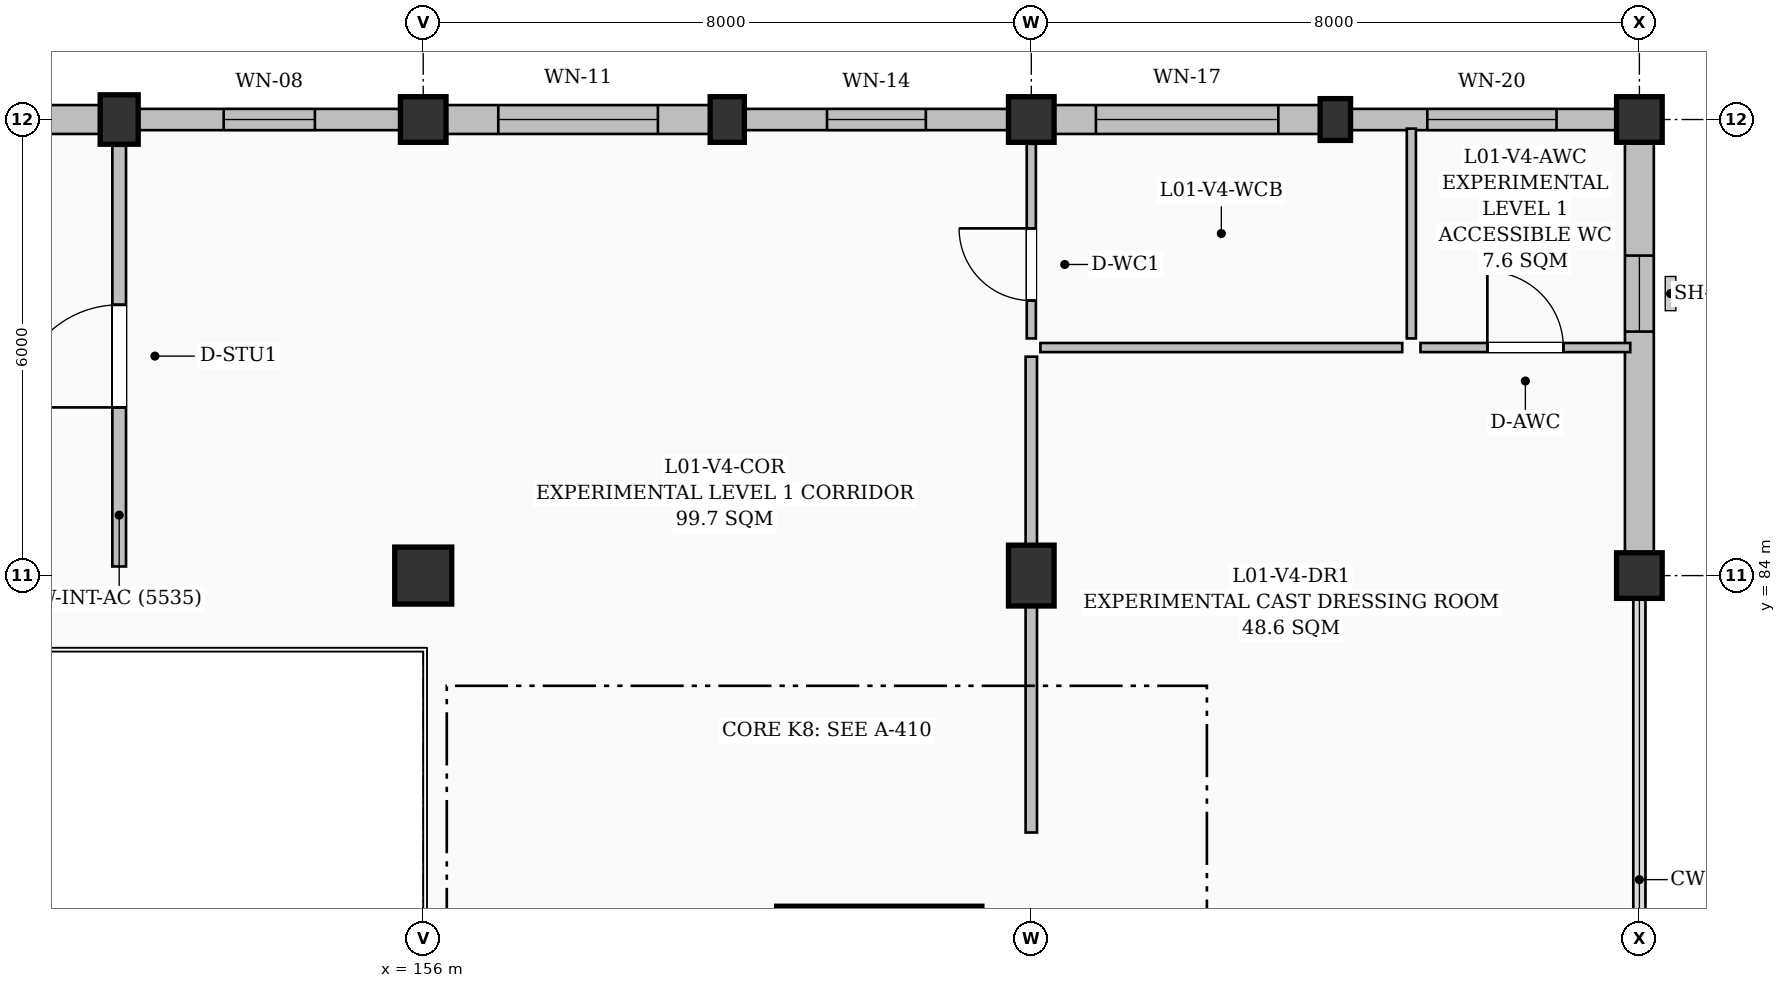
"""IFC4 building model, lengths in metres.
Left out: names, types, materials, properties, quantities, classifications, styles, units other than length and angle.
Written with IfcOpenShell. Run it as: python <this file> out.ifc"""

import sys

from ifc_helpers import new_model, si_unit, direction, frame, frame_2d, origin, origin_2d, place, context, subcontext, project, spatial, rectangle, extrude, element, fill, save


model = new_model("IFC4")
c1 = context("Model", 3, precision=1e-05, world=origin(), true_north=direction((0.0, 1.0)))
c2 = subcontext(c1, "Body", "Model", "MODEL_VIEW")
j1 = project(units=[si_unit("LENGTHUNIT", "METRE"), si_unit("PLANEANGLEUNIT", "RADIAN")], contexts=[c1])
p1 = place(None, origin())
s1 = spatial("IfcSite", under=j1, at=p1, CompositionType="ELEMENT")
p2 = place(p1, origin())
s2 = spatial("IfcBuilding", under=s1, at=p2, CompositionType="ELEMENT")
p3 = place(p2, frame((0.0, 0.0, 4.8)))
s3 = spatial("IfcBuildingStorey", under=s2, at=p3, CompositionType="ELEMENT", Elevation=4.8)
p4 = place(p3, frame((152.0, 90.0, 0.0), z_axis=(0.0, 0.0, 1.0), x_axis=(1.0, 0.0, 0.0)))
e1 = element("IfcColumn", 1, at=p4, inside=s3, PredefinedType="PILASTER", context=c2, shape_type="SweptSolid", body=[
    extrude(rectangle(XDim=0.5, YDim=0.65, at=origin_2d()), origin(), (0.0, 0.0, 1.0), 4.5),
])
p5 = place(p3, frame((156.0, 84.0, 0.0), z_axis=(0.0, 0.0, 1.0), x_axis=(1.0, 0.0, 0.0)))
e2 = element("IfcColumn", 2, at=p5, inside=s3, PredefinedType="COLUMN", context=c2, shape_type="SweptSolid", body=[
    extrude(rectangle(XDim=0.75, YDim=0.75, at=origin_2d()), origin(), (0.0, 0.0, 1.0), 4.5),
])
p6 = place(p3, frame((156.0, 90.0, 0.0), z_axis=(0.0, 0.0, 1.0), x_axis=(1.0, 0.0, 0.0)))
e3 = element("IfcColumn", 3, at=p6, inside=s3, PredefinedType="COLUMN", context=c2, shape_type="SweptSolid", body=[
    extrude(rectangle(XDim=0.6, YDim=0.6, at=origin_2d()), origin(), (0.0, 0.0, 1.0), 4.5),
])
p7 = place(p3, frame((160.0, 90.0, 0.0), z_axis=(0.0, 0.0, 1.0), x_axis=(1.0, 0.0, 0.0)))
e4 = element("IfcColumn", 4, at=p7, inside=s3, PredefinedType="PILASTER", context=c2, shape_type="SweptSolid", body=[
    extrude(rectangle(XDim=0.45, YDim=0.6, at=origin_2d()), origin(), (0.0, 0.0, 1.0), 4.5),
])
p8 = place(p3, frame((164.0, 84.0, 0.0), z_axis=(0.0, 0.0, 1.0), x_axis=(1.0, 0.0, 0.0)))
e5 = element("IfcColumn", 5, at=p8, inside=s3, PredefinedType="COLUMN", context=c2, shape_type="SweptSolid", body=[
    extrude(rectangle(XDim=0.6, YDim=0.8, at=origin_2d()), origin(), (0.0, 0.0, 1.0), 4.5),
])
p9 = place(p3, frame((164.0, 90.0, 0.0), z_axis=(0.0, 0.0, 1.0), x_axis=(1.0, 0.0, 0.0)))
e6 = element("IfcColumn", 6, at=p9, inside=s3, PredefinedType="COLUMN", context=c2, shape_type="SweptSolid", body=[
    extrude(rectangle(XDim=0.6, YDim=0.6, at=origin_2d()), origin(), (0.0, 0.0, 1.0), 4.5),
])
p10 = place(p3, frame((168.0, 90.0, 0.0), z_axis=(0.0, 0.0, 1.0), x_axis=(1.0, 0.0, 0.0)))
e7 = element("IfcColumn", 7, at=p10, inside=s3, PredefinedType="PILASTER", context=c2, shape_type="SweptSolid", body=[
    extrude(rectangle(XDim=0.4, YDim=0.55, at=origin_2d()), origin(), (0.0, 0.0, 1.0), 4.5),
])
for number, where, z_axis, x_axis in (
    (8, (172.0, 84.0, 0.0), (0.0, 0.0, 1.0), (1.0, 0.0, 0.0)),
    (9, (172.0, 90.0, 0.0), (0.0, 0.0, 1.0), (1.0, 0.0, 0.0)),
):
    element("IfcColumn", number, at=place(p3, frame(where, z_axis=z_axis, x_axis=x_axis)), inside=s3, PredefinedType="COLUMN", context=c2, shape_type="SweptSolid", body=[
        extrude(rectangle(XDim=0.6, YDim=0.6, at=origin_2d()), origin(), (0.0, 0.0, 1.0), 4.5),
    ])
p11 = place(p3, frame((148.3, 90.0, 0.0), z_axis=(0.0, 0.0, 1.0), x_axis=(1.0, 0.0, 0.0)))
e10 = element("IfcWall", 10, at=p11, inside=s3, PredefinedType="SOLIDWALL", context=c2, shape_type="SweptSolid", body=[
    extrude(rectangle(XDim=3.45, YDim=0.38, at=frame_2d((1.725, 0.0))), origin(), (0.0, 0.0, 1.0), 3.735),
])
p12 = place(p11, frame((0.725, 0.0, 0.95)))
e11 = element("IfcOpeningElement", 11, at=p12, cuts=e10, PredefinedType="OPENING", context=c2, shape_type="SweptSolid", body=[
    extrude(rectangle(XDim=2.0, YDim=1.8, at=frame_2d((1.0, 0.9))), frame((0.0, 0.2, 0.0), z_axis=(0.0, -1.0, 0.0), x_axis=(1.0, 0.0, 0.0)), (0.0, 0.0, 1.0), 0.4),
])
p13 = place(p3, frame((152.25, 90.0, 0.0), z_axis=(0.0, 0.0, 1.0), x_axis=(1.0, 0.0, 0.0)))
e12 = element("IfcWall", 12, at=p13, inside=s3, PredefinedType="SOLIDWALL", context=c2, shape_type="SweptSolid", body=[
    extrude(rectangle(XDim=3.45, YDim=0.28, at=frame_2d((1.725, 0.0))), origin(), (0.0, 0.0, 1.0), 3.735),
])
p14 = place(p13, frame((1.125, 0.0, 0.95)))
e13 = element("IfcOpeningElement", 13, at=p14, cuts=e12, PredefinedType="OPENING", context=c2, shape_type="SweptSolid", body=[
    extrude(rectangle(XDim=1.2, YDim=1.5, at=frame_2d((0.6, 0.75))), frame((0.0, 0.15, 0.0), z_axis=(0.0, -1.0, 0.0), x_axis=(1.0, 0.0, 0.0)), (0.0, 0.0, 1.0), 0.3),
])
p15 = place(p3, frame((156.3, 90.0, 0.0), z_axis=(0.0, 0.0, 1.0), x_axis=(1.0, 0.0, 0.0)))
e14 = element("IfcWall", 14, at=p15, inside=s3, PredefinedType="SOLIDWALL", context=c2, shape_type="SweptSolid", body=[
    extrude(rectangle(XDim=3.475, YDim=0.38, at=frame_2d((1.737, 0.0))), origin(), (0.0, 0.0, 1.0), 3.685),
])
p16 = place(p15, frame((0.688, 0.0, 0.95)))
e15 = element("IfcOpeningElement", 15, at=p16, cuts=e14, PredefinedType="OPENING", context=c2, shape_type="SweptSolid", body=[
    extrude(rectangle(XDim=2.1, YDim=1.5, at=frame_2d((1.05, 0.75))), frame((0.0, 0.2, 0.0), z_axis=(0.0, -1.0, 0.0), x_axis=(1.0, 0.0, 0.0)), (0.0, 0.0, 1.0), 0.4),
])
p17 = place(p3, frame((160.225, 90.0, 0.0), z_axis=(0.0, 0.0, 1.0), x_axis=(1.0, 0.0, 0.0)))
e16 = element("IfcWall", 16, at=p17, inside=s3, PredefinedType="SOLIDWALL", context=c2, shape_type="SweptSolid", body=[
    extrude(rectangle(XDim=3.475, YDim=0.28, at=frame_2d((1.737, 0.0))), origin(), (0.0, 0.0, 1.0), 3.685),
])
p18 = place(p17, frame((1.087, 0.0, 0.95)))
e17 = element("IfcOpeningElement", 17, at=p18, cuts=e16, PredefinedType="OPENING", context=c2, shape_type="SweptSolid", body=[
    extrude(rectangle(XDim=1.3, YDim=1.4, at=frame_2d((0.65, 0.7))), frame((0.0, 0.15, 0.0), z_axis=(0.0, -1.0, 0.0), x_axis=(1.0, 0.0, 0.0)), (0.0, 0.0, 1.0), 0.3),
])
p19 = place(p3, frame((164.3, 90.0, 0.0), z_axis=(0.0, 0.0, 1.0), x_axis=(1.0, 0.0, 0.0)))
e18 = element("IfcWall", 18, at=p19, inside=s3, PredefinedType="SOLIDWALL", context=c2, shape_type="SweptSolid", body=[
    extrude(rectangle(XDim=3.5, YDim=0.38, at=frame_2d((1.75, 0.0))), origin(), (0.0, 0.0, 1.0), 3.635),
])
p20 = place(p19, frame((0.55, 0.0, 0.95)))
e19 = element("IfcOpeningElement", 19, at=p20, cuts=e18, PredefinedType="OPENING", context=c2, shape_type="SweptSolid", body=[
    extrude(rectangle(XDim=2.4, YDim=1.2, at=frame_2d((1.2, 0.6))), frame((0.0, 0.2, 0.0), z_axis=(0.0, -1.0, 0.0), x_axis=(1.0, 0.0, 0.0)), (0.0, 0.0, 1.0), 0.4),
])
p21 = place(p3, frame((168.2, 90.0, 0.0), z_axis=(0.0, 0.0, 1.0), x_axis=(1.0, 0.0, 0.0)))
e20 = element("IfcWall", 20, at=p21, inside=s3, PredefinedType="SOLIDWALL", context=c2, shape_type="SweptSolid", body=[
    extrude(rectangle(XDim=3.5, YDim=0.28, at=frame_2d((1.75, 0.0))), origin(), (0.0, 0.0, 1.0), 3.635),
])
p22 = place(p21, frame((1.01, 0.0, 0.95)))
e21 = element("IfcOpeningElement", 21, at=p22, cuts=e20, PredefinedType="OPENING", context=c2, shape_type="SweptSolid", body=[
    extrude(rectangle(XDim=1.7, YDim=2.0, at=frame_2d((0.85, 1.0))), frame((0.0, 0.15, 0.0), z_axis=(0.0, -1.0, 0.0), x_axis=(1.0, 0.0, 0.0)), (0.0, 0.0, 1.0), 0.3),
])
p23 = place(p3, frame((172.0, 89.7, 0.0), z_axis=(0.0, 0.0, 1.0), x_axis=(0.0, -1.0, 0.0)))
e22 = element("IfcWall", 22, at=p23, inside=s3, PredefinedType="SOLIDWALL", context=c2, shape_type="SweptSolid", body=[
    extrude(rectangle(XDim=5.4, YDim=0.38, at=frame_2d((2.7, 0.0))), origin(), (0.0, 0.0, 1.0), 3.935),
])
p24 = place(p23, frame((1.49, 0.0, 0.95)))
e23 = element("IfcOpeningElement", 23, at=p24, cuts=e22, PredefinedType="OPENING", context=c2, shape_type="SweptSolid", body=[
    extrude(rectangle(XDim=1.0, YDim=1.4, at=frame_2d((0.5, 0.7))), frame((0.0, 0.2, 0.0), z_axis=(0.0, -1.0, 0.0), x_axis=(1.0, 0.0, 0.0)), (0.0, 0.0, 1.0), 0.4),
])
p25 = place(p3, frame((163.35, 79.5, 0.0), z_axis=(0.0, 0.0, 1.0), x_axis=(-1.0, 0.0, 0.0)))
e24 = element("IfcWall", 24, at=p25, inside=s3, PredefinedType="SHEAR", context=c2, shape_type="SweptSolid", body=[
    extrude(rectangle(XDim=2.7, YDim=0.3, at=frame_2d((1.35, 0.0))), origin(), (0.0, 0.0, 1.0), 4.25),
])
p26 = place(p3, frame((152.0, 84.12, 0.0), z_axis=(0.0, 0.0, 1.0), x_axis=(0.0, 1.0, 0.0)))
e25 = element("IfcWall", 25, at=p26, inside=s3, PredefinedType="PARTITIONING", context=c2, shape_type="SweptSolid", body=[
    extrude(rectangle(XDim=5.535, YDim=0.18, at=frame_2d((2.768, 0.0))), origin(), (0.0, 0.0, 1.0), 4.25),
])
p27 = place(p26, frame((2.093, 0.0, 0.0)))
e26 = element("IfcOpeningElement", 26, at=p27, cuts=e25, PredefinedType="OPENING", context=c2, shape_type="SweptSolid", body=[
    extrude(rectangle(XDim=1.35, YDim=2.2, at=frame_2d((0.675, 1.1))), frame((0.0, 0.1, 0.0), z_axis=(0.0, -1.0, 0.0), x_axis=(1.0, 0.0, 0.0)), (0.0, 0.0, 1.0), 0.2),
])
p28 = place(p3, frame((164.0, 80.62, 0.0), z_axis=(0.0, 0.0, 1.0), x_axis=(0.0, 1.0, 0.0)))
e27 = element("IfcWall", 27, at=p28, inside=s3, PredefinedType="PARTITIONING", context=c2, shape_type="SweptSolid", body=[
    extrude(rectangle(XDim=6.26, YDim=0.15, at=frame_2d((3.13, 0.0))), origin(), (0.0, 0.0, 1.0), 3.785),
])
p29 = place(p3, frame((164.0, 87.12, 0.0), z_axis=(0.0, 0.0, 1.0), x_axis=(0.0, 1.0, 0.0)))
e28 = element("IfcWall", 28, at=p29, inside=s3, PredefinedType="PARTITIONING", context=c2, shape_type="SweptSolid", body=[
    extrude(rectangle(XDim=2.56, YDim=0.12, at=frame_2d((1.28, 0.0))), origin(), (0.0, 0.0, 1.0), 3.875),
])
p30 = place(p29, frame((0.498, 0.0, 0.0)))
e29 = element("IfcOpeningElement", 29, at=p30, cuts=e28, PredefinedType="OPENING", context=c2, shape_type="SweptSolid", body=[
    extrude(rectangle(XDim=0.95, YDim=2.1, at=frame_2d((0.475, 1.05))), frame((0.0, 0.07, 0.0), z_axis=(0.0, -1.0, 0.0), x_axis=(1.0, 0.0, 0.0)), (0.0, 0.0, 1.0), 0.14),
])
p31 = place(p3, frame((169.12, 87.0, 0.0), z_axis=(0.0, 0.0, 1.0), x_axis=(1.0, 0.0, 0.0)))
e30 = element("IfcWall", 30, at=p31, inside=s3, PredefinedType="PARTITIONING", context=c2, shape_type="SweptSolid", body=[
    extrude(rectangle(XDim=2.76, YDim=0.12, at=frame_2d((1.38, 0.0))), origin(), (0.0, 0.0, 1.0), 3.835),
])
p32 = place(p31, frame((0.88, 0.0, 0.0)))
e31 = element("IfcOpeningElement", 31, at=p32, cuts=e30, PredefinedType="OPENING", context=c2, shape_type="SweptSolid", body=[
    extrude(rectangle(XDim=1.0, YDim=2.1, at=frame_2d((0.5, 1.05))), frame((0.0, 0.07, 0.0), z_axis=(0.0, -1.0, 0.0), x_axis=(1.0, 0.0, 0.0)), (0.0, 0.0, 1.0), 0.14),
])
p33 = place(p3, frame((164.12, 87.0, 0.0), z_axis=(0.0, 0.0, 1.0), x_axis=(1.0, 0.0, 0.0)))
e32 = element("IfcWall", 32, at=p33, inside=s3, PredefinedType="PARTITIONING", context=c2, shape_type="SweptSolid", body=[
    extrude(rectangle(XDim=4.76, YDim=0.12, at=frame_2d((2.38, 0.0))), origin(), (0.0, 0.0, 1.0), 3.835),
])
p34 = place(p3, frame((169.0, 87.12, 0.0), z_axis=(0.0, 0.0, 1.0), x_axis=(0.0, 1.0, 0.0)))
e33 = element("IfcWall", 33, at=p34, inside=s3, PredefinedType="PARTITIONING", context=c2, shape_type="SweptSolid", body=[
    extrude(rectangle(XDim=2.76, YDim=0.12, at=frame_2d((1.38, 0.0))), origin(), (0.0, 0.0, 1.0), 4.25),
])
p35 = place(p14, origin())
e34 = element("IfcWindow", 34, at=p35, inside=s3, PartitioningType="SINGLE_PANEL", PredefinedType="WINDOW", context=c2, shape_type="SweptSolid", body=[
    extrude(rectangle(XDim=1.2, YDim=1.5, at=frame_2d((0.6, 0.75))), frame((0.0, 0.03, 0.0), z_axis=(0.0, -1.0, 0.0), x_axis=(1.0, 0.0, 0.0)), (0.0, 0.0, 1.0), 0.06),
])
fill(e13, e34)
p36 = place(p16, origin())
e35 = element("IfcWindow", 35, at=p36, inside=s3, PartitioningType="TRIPLE_PANEL_VERTICAL", PredefinedType="WINDOW", context=c2, shape_type="SweptSolid", body=[
    extrude(rectangle(XDim=2.1, YDim=1.5, at=frame_2d((1.05, 0.75))), frame((0.0, 0.03, 0.0), z_axis=(0.0, -1.0, 0.0), x_axis=(1.0, 0.0, 0.0)), (0.0, 0.0, 1.0), 0.06),
])
fill(e15, e35)
p37 = place(p18, origin())
e36 = element("IfcWindow", 36, at=p37, inside=s3, PartitioningType="SINGLE_PANEL", PredefinedType="WINDOW", context=c2, shape_type="SweptSolid", body=[
    extrude(rectangle(XDim=1.3, YDim=1.4, at=frame_2d((0.65, 0.7))), frame((0.0, 0.03, 0.0), z_axis=(0.0, -1.0, 0.0), x_axis=(1.0, 0.0, 0.0)), (0.0, 0.0, 1.0), 0.06),
])
fill(e17, e36)
p38 = place(p20, origin())
e37 = element("IfcWindow", 37, at=p38, inside=s3, PartitioningType="TRIPLE_PANEL_HORIZONTAL", PredefinedType="WINDOW", context=c2, shape_type="SweptSolid", body=[
    extrude(rectangle(XDim=2.4, YDim=1.2, at=frame_2d((1.2, 0.6))), frame((0.0, 0.03, 0.0), z_axis=(0.0, -1.0, 0.0), x_axis=(1.0, 0.0, 0.0)), (0.0, 0.0, 1.0), 0.06),
])
fill(e19, e37)
p39 = place(p22, origin())
e38 = element("IfcWindow", 38, at=p39, inside=s3, PartitioningType="DOUBLE_PANEL_VERTICAL", PredefinedType="WINDOW", context=c2, shape_type="SweptSolid", body=[
    extrude(rectangle(XDim=1.7, YDim=2.0, at=frame_2d((0.85, 1.0))), frame((0.0, 0.03, 0.0), z_axis=(0.0, -1.0, 0.0), x_axis=(1.0, 0.0, 0.0)), (0.0, 0.0, 1.0), 0.06),
])
fill(e21, e38)
p40 = place(p24, origin())
e39 = element("IfcWindow", 39, at=p40, inside=s3, PartitioningType="SINGLE_PANEL", PredefinedType="WINDOW", context=c2, shape_type="SweptSolid", body=[
    extrude(rectangle(XDim=1.0, YDim=1.4, at=frame_2d((0.5, 0.7))), frame((0.0, 0.03, 0.0), z_axis=(0.0, -1.0, 0.0), x_axis=(1.0, 0.0, 0.0)), (0.0, 0.0, 1.0), 0.06),
])
fill(e23, e39)
p41 = place(p27, origin())
e40 = element("IfcDoor", 40, at=p41, inside=s3, OperationType="SINGLE_SWING_LEFT", PredefinedType="DOOR", context=c2, shape_type="SweptSolid", body=[
    extrude(rectangle(XDim=1.35, YDim=2.2, at=frame_2d((0.675, 1.1))), frame((0.0, 0.025, 0.0), z_axis=(0.0, -1.0, 0.0), x_axis=(1.0, 0.0, 0.0)), (0.0, 0.0, 1.0), 0.05),
])
fill(e26, e40)
p42 = place(p30, origin())
e41 = element("IfcDoor", 41, at=p42, inside=s3, OperationType="SINGLE_SWING_RIGHT", PredefinedType="DOOR", context=c2, shape_type="SweptSolid", body=[
    extrude(rectangle(XDim=0.95, YDim=2.1, at=frame_2d((0.475, 1.05))), frame((0.0, 0.025, 0.0), z_axis=(0.0, -1.0, 0.0), x_axis=(1.0, 0.0, 0.0)), (0.0, 0.0, 1.0), 0.05),
])
fill(e29, e41)
p43 = place(p32, origin())
e42 = element("IfcDoor", 42, at=p43, inside=s3, OperationType="SINGLE_SWING_LEFT", PredefinedType="DOOR", context=c2, shape_type="SweptSolid", body=[
    extrude(rectangle(XDim=1.0, YDim=2.1, at=frame_2d((0.5, 1.05))), frame((0.0, 0.025, 0.0), z_axis=(0.0, -1.0, 0.0), x_axis=(1.0, 0.0, 0.0)), (0.0, 0.0, 1.0), 0.05),
])
fill(e31, e42)
save(model, sys.argv[1])
